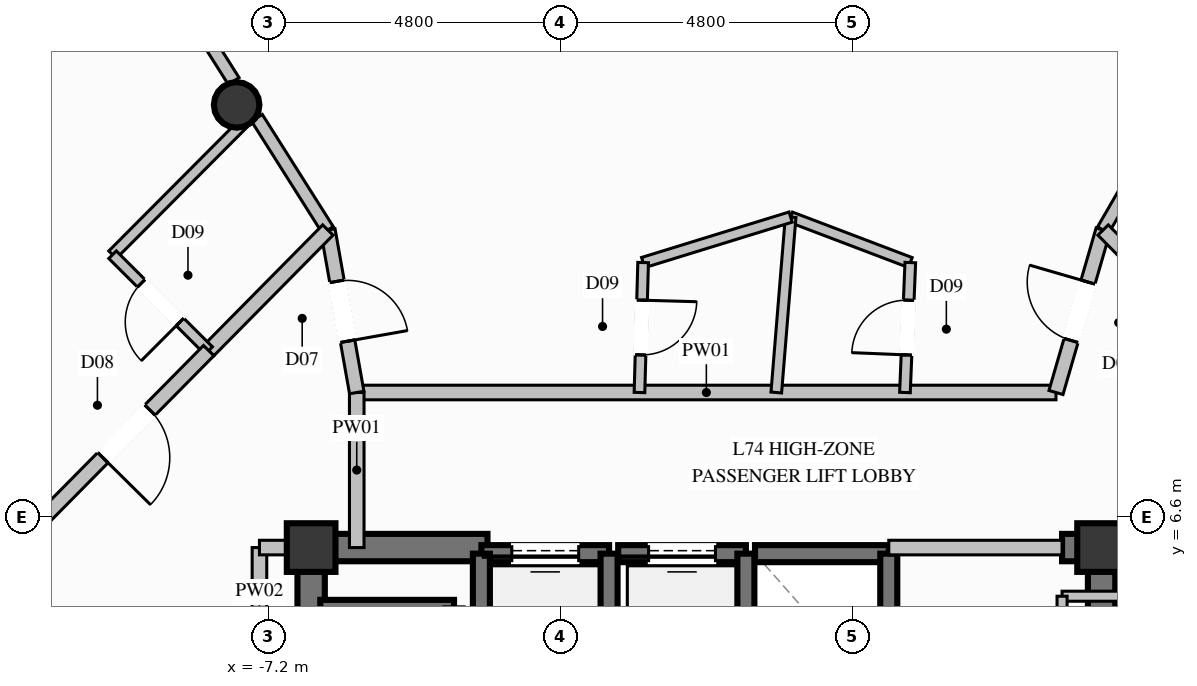
"""IFC4 building model, lengths in metres.
Left out: names, types, materials, properties, quantities, classifications, styles, units other than length and angle.
Written with IfcOpenShell. Run it as: python <this file> out.ifc"""

import sys

from ifc_helpers import new_model, si_unit, direction, frame, frame_2d, origin, origin_2d, place, context, subcontext, project, spatial, rectangle, circle, extrude, element, fill, save


model = new_model("IFC4")
c1 = context("Model", 3, precision=1e-05, world=origin(), true_north=direction((0.0, 1.0)))
c2 = subcontext(c1, "Body", "Model", "MODEL_VIEW")
j1 = project(units=[si_unit("LENGTHUNIT", "METRE"), si_unit("PLANEANGLEUNIT", "RADIAN")], contexts=[c1])
p1 = place(None, origin())
s1 = spatial("IfcSite", under=j1, at=p1, CompositionType="ELEMENT")
p2 = place(p1, origin())
s2 = spatial("IfcBuilding", under=s1, at=p2, CompositionType="ELEMENT")
p3 = place(p2, frame((0.0, 0.0, 285.8)))
s3 = spatial("IfcBuildingStorey", under=s2, at=p3, CompositionType="ELEMENT", Elevation=285.8)
for number, where, z_axis, x_axis in (
    (1, (6.5, 6.1, 0.0), (0.0, 0.0, 1.0), (1.0, 0.0, 0.0)),
    (2, (-6.5, 6.1, 0.0), (0.0, 0.0, 1.0), (1.0, 0.0, 0.0)),
):
    element("IfcColumn", number, at=place(p3, frame(where, z_axis=z_axis, x_axis=x_axis)), inside=s3, PredefinedType="COLUMN", context=c2, shape_type="SweptSolid", body=[
        extrude(rectangle(XDim=0.8, YDim=0.8, at=origin_2d()), origin(), (0.0, 0.0, 1.0), 3.8),
    ])
p4 = place(p3, frame((-6.275, 6.1, 0.0), z_axis=(0.0, 0.0, 1.0), x_axis=(1.0, 0.0, 0.0)))
e3 = element("IfcWall", 3, at=p4, inside=s3, PredefinedType="SHEAR", context=c2, shape_type="SweptSolid", body=[
    extrude(rectangle(XDim=2.675, YDim=0.45, at=frame_2d((1.337, 0.0))), origin(), (0.0, 0.0, 1.0), 3.8),
])
p5 = place(p3, frame((5.85, 6.1, 0.0), z_axis=(0.0, 0.0, 1.0), x_axis=(1.0, 0.0, 0.0)))
e4 = element("IfcWall", 4, at=p5, inside=s3, PredefinedType="SHEAR", context=c2, shape_type="SweptSolid", body=[
    extrude(rectangle(XDim=0.425, YDim=0.45, at=frame_2d((0.212, 0.0))), origin(), (0.0, 0.0, 1.0), 3.8),
])
p6 = place(p3, frame((-6.5, 2.35, 0.0), z_axis=(0.0, 0.0, 1.0), x_axis=(0.0, 1.0, 0.0)))
e5 = element("IfcWall", 5, at=p6, inside=s3, PredefinedType="SHEAR", context=c2, shape_type="SweptSolid", body=[
    extrude(rectangle(XDim=3.975, YDim=0.45, at=frame_2d((1.987, 0.0))), origin(), (0.0, 0.0, 1.0), 3.8),
])
p7 = place(p3, frame((6.5, 3.35, 0.0), z_axis=(0.0, 0.0, 1.0), x_axis=(0.0, 1.0, 0.0)))
e6 = element("IfcWall", 6, at=p7, inside=s3, PredefinedType="SHEAR", context=c2, shape_type="SweptSolid", body=[
    extrude(rectangle(XDim=2.975, YDim=0.45, at=frame_2d((1.487, 0.0))), origin(), (0.0, 0.0, 1.0), 3.8),
])
p8 = place(p3, frame((-7.725, 13.38, 0.0), z_axis=(0.0, 0.0, 1.0), x_axis=(1.0, 0.0, 0.0)))
e7 = element("IfcColumn", 7, at=p8, inside=s3, PredefinedType="COLUMN", context=c2, shape_type="SweptSolid", body=[
    extrude(circle(Radius=0.375, at=origin_2d()), origin(), (0.0, 0.0, 1.0), 3.8),
])
p9 = place(p3, frame((-1.6, 6.0, 0.0), z_axis=(0.0, 0.0, 1.0), x_axis=(-1.0, 0.0, 0.0)))
e8 = element("IfcWall", 8, at=p9, inside=s3, PredefinedType="SOLIDWALL", context=c2, shape_type="SweptSolid", body=[
    extrude(rectangle(XDim=2.1, YDim=0.28, at=frame_2d((1.05, 0.0))), origin(), (0.0, 0.0, 1.0), 3.57),
])
p10 = place(p9, frame((0.5, 0.0, 0.0)))
e9 = element("IfcOpeningElement", 9, at=p10, cuts=e8, PredefinedType="OPENING", context=c2, shape_type="SweptSolid", body=[
    extrude(rectangle(XDim=1.1, YDim=2.2, at=frame_2d((0.55, 1.1))), frame((0.0, 0.15, 0.0), z_axis=(0.0, -1.0, 0.0), x_axis=(1.0, 0.0, 0.0)), (0.0, 0.0, 1.0), 0.3),
])
for number, where, z_axis, x_axis in (
    (10, (-3.7, 6.0, 0.0), (0.0, 0.0, 1.0), (0.0, -1.0, 0.0)),
    (11, (-1.6, 3.5, 0.0), (0.0, 0.0, 1.0), (0.0, 1.0, 0.0)),
):
    element("IfcWall", number, at=place(p3, frame(where, z_axis=z_axis, x_axis=x_axis)), inside=s3, PredefinedType="SOLIDWALL", context=c2, shape_type="SweptSolid", body=[
        extrude(rectangle(XDim=2.5, YDim=0.28, at=frame_2d((1.25, 0.0))), origin(), (0.0, 0.0, 1.0), 3.57),
    ])
p11 = place(p3, frame((0.65, 6.0, 0.0), z_axis=(0.0, 0.0, 1.0), x_axis=(-1.0, 0.0, 0.0)))
e12 = element("IfcWall", 12, at=p11, inside=s3, PredefinedType="SOLIDWALL", context=c2, shape_type="SweptSolid", body=[
    extrude(rectangle(XDim=2.1, YDim=0.28, at=frame_2d((1.05, 0.0))), origin(), (0.0, 0.0, 1.0), 3.57),
])
p12 = place(p11, frame((0.5, 0.0, 0.0)))
e13 = element("IfcOpeningElement", 13, at=p12, cuts=e12, PredefinedType="OPENING", context=c2, shape_type="SweptSolid", body=[
    extrude(rectangle(XDim=1.1, YDim=2.2, at=frame_2d((0.55, 1.1))), frame((0.0, 0.15, 0.0), z_axis=(0.0, -1.0, 0.0), x_axis=(1.0, 0.0, 0.0)), (0.0, 0.0, 1.0), 0.3),
])
p13 = place(p3, frame((0.65, 3.5, 0.0), z_axis=(0.0, 0.0, 1.0), x_axis=(0.0, 1.0, 0.0)))
e14 = element("IfcWall", 14, at=p13, inside=s3, PredefinedType="SOLIDWALL", context=c2, shape_type="SweptSolid", body=[
    extrude(rectangle(XDim=2.5, YDim=0.28, at=frame_2d((1.25, 0.0))), origin(), (0.0, 0.0, 1.0), 3.57),
])
p14 = place(p3, frame((3.0, 6.0, 0.0), z_axis=(0.0, 0.0, 1.0), x_axis=(-1.0, 0.0, 0.0)))
e15 = element("IfcWall", 15, at=p14, inside=s3, PredefinedType="SOLIDWALL", context=c2, shape_type="SweptSolid", body=[
    extrude(rectangle(XDim=2.2, YDim=0.28, at=frame_2d((1.1, 0.0))), origin(), (0.0, 0.0, 1.0), 3.57),
])
p15 = place(p3, frame((3.0, 3.5, 0.0), z_axis=(0.0, 0.0, 1.0), x_axis=(0.0, 1.0, 0.0)))
e16 = element("IfcWall", 16, at=p15, inside=s3, PredefinedType="SOLIDWALL", context=c2, shape_type="SweptSolid", body=[
    extrude(rectangle(XDim=2.5, YDim=0.28, at=frame_2d((1.25, 0.0))), origin(), (0.0, 0.0, 1.0), 3.57),
])
p16 = place(p3, frame((-4.15, 5.1, 0.0), z_axis=(0.0, 0.0, 1.0), x_axis=(-1.0, 0.0, 0.0)))
e17 = element("IfcWall", 17, at=p16, inside=s3, PredefinedType="SOLIDWALL", context=c2, shape_type="SweptSolid", body=[
    extrude(rectangle(XDim=2.2, YDim=0.28, at=frame_2d((1.1, 0.0))), origin(), (0.0, 0.0, 1.0), 3.57),
])
p17 = place(p3, frame((-5.75, 8.65, 0.0), z_axis=(0.0, 0.0, 1.0), x_axis=(1.0, 0.0, 0.0)))
e18 = element("IfcWall", 18, at=p17, inside=s3, PredefinedType="PARTITIONING", context=c2, shape_type="SweptSolid", body=[
    extrude(rectangle(XDim=11.5, YDim=0.24, at=frame_2d((5.75, 0.0))), origin(), (0.0, 0.0, 1.0), 3.57),
])
p18 = place(p3, frame((3.0, 6.1, 0.0), z_axis=(0.0, 0.0, 1.0), x_axis=(1.0, 0.0, 0.0)))
e19 = element("IfcWall", 19, at=p18, inside=s3, PredefinedType="PARTITIONING", context=c2, shape_type="SweptSolid", body=[
    extrude(rectangle(XDim=2.85, YDim=0.24, at=frame_2d((1.425, 0.0))), origin(), (0.0, 0.0, 1.0), 2.655),
])
p19 = place(p3, frame((6.5, 6.1, 0.0), z_axis=(0.0, 0.0, 1.0), x_axis=(1.0, 0.0, 0.0)))
e20 = element("IfcWall", 20, at=p19, inside=s3, PredefinedType="PARTITIONING", context=c2, shape_type="SweptSolid", body=[
    extrude(rectangle(XDim=0.85, YDim=0.24, at=frame_2d((0.425, 0.0))), origin(), (0.0, 0.0, 1.0), 3.011),
])
p20 = place(p3, frame((-5.75, 6.1, 0.0), z_axis=(0.0, 0.0, 1.0), x_axis=(0.0, 1.0, 0.0)))
e21 = element("IfcWall", 21, at=p20, inside=s3, PredefinedType="PARTITIONING", context=c2, shape_type="SweptSolid", body=[
    extrude(rectangle(XDim=2.55, YDim=0.24, at=frame_2d((1.275, 0.0))), origin(), (0.0, 0.0, 1.0), 3.57),
])
p21 = place(p3, frame((-7.35, 4.95, 0.0), z_axis=(0.0, 0.0, 1.0), x_axis=(0.0, 1.0, 0.0)))
e22 = element("IfcWall", 22, at=p21, inside=s3, PredefinedType="PARTITIONING", context=c2, shape_type="SweptSolid", body=[
    extrude(rectangle(XDim=1.15, YDim=0.24, at=frame_2d((0.575, 0.0))), origin(), (0.0, 0.0, 1.0), 2.655),
])
p22 = place(p3, frame((-7.35, 6.1, 0.0), z_axis=(0.0, 0.0, 1.0), x_axis=(1.0, 0.0, 0.0)))
e23 = element("IfcWall", 23, at=p22, inside=s3, PredefinedType="PARTITIONING", context=c2, shape_type="SweptSolid", body=[
    extrude(rectangle(XDim=0.85, YDim=0.24, at=frame_2d((0.425, 0.0))), origin(), (0.0, 0.0, 1.0), 3.011),
])
p23 = place(p3, frame((7.35, 5.3, 0.0), z_axis=(0.0, 0.0, 1.0), x_axis=(-1.0, 0.0, 0.0)))
e24 = element("IfcWall", 24, at=p23, inside=s3, PredefinedType="PARTITIONING", context=c2, shape_type="SweptSolid", body=[
    extrude(rectangle(XDim=1.5, YDim=0.165, at=frame_2d((0.75, 0.0))), origin(), (0.0, 0.0, 1.0), 2.655),
])
p24 = place(p3, frame((5.85, 5.3, 0.0), z_axis=(0.0, 0.0, 1.0), x_axis=(0.0, -1.0, 0.0)))
e25 = element("IfcWall", 25, at=p24, inside=s3, PredefinedType="PARTITIONING", context=c2, shape_type="SweptSolid", body=[
    extrude(rectangle(XDim=2.55, YDim=0.165, at=frame_2d((1.275, 0.0))), origin(), (0.0, 0.0, 1.0), 2.655),
])
p25 = place(p3, frame((6.525, 11.322, 0.0), z_axis=(0.0, 0.0, 1.0), x_axis=(0.501738314133, 0.865019458817, 0.0)))
e26 = element("IfcWall", 26, at=p25, inside=s3, PredefinedType="PARTITIONING", context=c2, shape_type="SweptSolid", body=[
    extrude(rectangle(XDim=1.987, YDim=0.21, at=frame_2d((0.994, 0.0))), origin(), (0.0, 0.0, 1.0), 3.011),
])
p26 = place(p3, frame((-6.225, 11.322, 0.0), z_axis=(0.0, 0.0, 1.0), x_axis=(-0.534565103323, 0.845127298287, 0.0)))
e27 = element("IfcWall", 27, at=p26, inside=s3, PredefinedType="PARTITIONING", context=c2, shape_type="SweptSolid", body=[
    extrude(rectangle(XDim=2.183, YDim=0.21, at=frame_2d((1.092, 0.0))), origin(), (0.0, 0.0, 1.0), 3.011),
])
p27 = place(p3, frame((-7.774, 13.772, 0.0), z_axis=(0.0, 0.0, 1.0), x_axis=(-0.534555632153, 0.845133288975, 0.0)))
e28 = element("IfcWall", 28, at=p27, inside=s3, PredefinedType="PARTITIONING", context=c2, shape_type="SweptSolid", body=[
    extrude(rectangle(XDim=3.803, YDim=0.21, at=frame_2d((1.901, 0.0))), origin(), (0.0, 0.0, 1.0), 3.57),
])
p28 = place(p3, frame((1.386, 11.535, 0.0), z_axis=(0.0, 0.0, 1.0), x_axis=(0.934790511534, -0.355199520758, 0.0)))
e29 = element("IfcWall", 29, at=p28, inside=s3, PredefinedType="PLUMBINGWALL", context=c2, shape_type="SweptSolid", body=[
    extrude(rectangle(XDim=2.105, YDim=0.175, at=frame_2d((1.053, 0.0))), origin(), (0.0, 0.0, 1.0), 3.57),
])
p29 = place(p3, frame((1.386, 11.535, 0.0), z_axis=(0.0, 0.0, 1.0), x_axis=(-0.081558642855, -0.99666854459, 0.0)))
e30 = element("IfcWall", 30, at=p29, inside=s3, PredefinedType="PLUMBINGWALL", context=c2, shape_type="SweptSolid", body=[
    extrude(rectangle(XDim=2.895, YDim=0.175, at=frame_2d((1.447, 0.0))), origin(), (0.0, 0.0, 1.0), 3.57),
])
p30 = place(p3, frame((3.266, 8.65, 0.0), z_axis=(0.0, 0.0, 1.0), x_axis=(0.04108932736, 0.999155476979, 0.0)))
e31 = element("IfcWall", 31, at=p30, inside=s3, PredefinedType="PLUMBINGWALL", context=c2, shape_type="SweptSolid", body=[
    extrude(rectangle(XDim=2.139, YDim=0.175, at=frame_2d((1.069, 0.0))), origin(), (0.0, 0.0, 1.0), 3.57),
])
p31 = place(p30, frame((0.619, 0.0, 0.0)))
e32 = element("IfcOpeningElement", 32, at=p31, cuts=e31, PredefinedType="OPENING", context=c2, shape_type="SweptSolid", body=[
    extrude(rectangle(XDim=0.9, YDim=2.1, at=frame_2d((0.45, 1.05))), frame((0.0, 0.098, 0.0), z_axis=(0.0, -1.0, 0.0), x_axis=(1.0, 0.0, 0.0)), (0.0, 0.0, 1.0), 0.195),
])
p32 = place(p3, frame((5.75, 8.65, 0.0), z_axis=(0.0, 0.0, 1.0), x_axis=(0.27852040308, 0.960430312448, 0.0)))
e33 = element("IfcWall", 33, at=p32, inside=s3, PredefinedType="PARTITIONING", context=c2, shape_type="SweptSolid", body=[
    extrude(rectangle(XDim=2.782, YDim=0.24, at=frame_2d((1.391, 0.0))), origin(), (0.0, 0.0, 1.0), 3.57),
])
p33 = place(p32, frame((0.891, 0.0, 0.0)))
e34 = element("IfcOpeningElement", 34, at=p33, cuts=e33, PredefinedType="OPENING", context=c2, shape_type="SweptSolid", body=[
    extrude(rectangle(XDim=1.0, YDim=2.2, at=frame_2d((0.5, 1.1))), frame((0.0, 0.13, 0.0), z_axis=(0.0, -1.0, 0.0), x_axis=(1.0, 0.0, 0.0)), (0.0, 0.0, 1.0), 0.26),
])
p34 = place(p3, frame((-1.04, 10.787, 0.0), z_axis=(0.0, 0.0, 1.0), x_axis=(0.955631255894, 0.294565617068, 0.0)))
e35 = element("IfcWall", 35, at=p34, inside=s3, PredefinedType="PLUMBINGWALL", context=c2, shape_type="SweptSolid", body=[
    extrude(rectangle(XDim=2.539, YDim=0.175, at=frame_2d((1.269, 0.0))), origin(), (0.0, 0.0, 1.0), 3.57),
])
p35 = place(p3, frame((-1.04, 10.787, 0.0), z_axis=(0.0, 0.0, 1.0), x_axis=(-0.028090350184, -0.999605388254, 0.0)))
e36 = element("IfcWall", 36, at=p35, inside=s3, PredefinedType="PLUMBINGWALL", context=c2, shape_type="SweptSolid", body=[
    extrude(rectangle(XDim=2.138, YDim=0.175, at=frame_2d((1.069, 0.0))), origin(), (0.0, 0.0, 1.0), 3.57),
])
p36 = place(p35, frame((0.619, 0.0, 0.0)))
e37 = element("IfcOpeningElement", 37, at=p36, cuts=e36, PredefinedType="OPENING", context=c2, shape_type="SweptSolid", body=[
    extrude(rectangle(XDim=0.9, YDim=2.1, at=frame_2d((0.45, 1.05))), frame((0.0, 0.098, 0.0), z_axis=(0.0, -1.0, 0.0), x_axis=(1.0, 0.0, 0.0)), (0.0, 0.0, 1.0), 0.195),
])
p37 = place(p3, frame((-6.225, 11.322, 0.0), z_axis=(0.0, 0.0, 1.0), x_axis=(0.175052712288, -0.984559062688, 0.0)))
e38 = element("IfcWall", 38, at=p37, inside=s3, PredefinedType="PARTITIONING", context=c2, shape_type="SweptSolid", body=[
    extrude(rectangle(XDim=2.714, YDim=0.24, at=frame_2d((1.357, 0.0))), origin(), (0.0, 0.0, 1.0), 3.57),
])
p38 = place(p37, frame((0.857, 0.0, 0.0)))
e39 = element("IfcOpeningElement", 39, at=p38, cuts=e38, PredefinedType="OPENING", context=c2, shape_type="SweptSolid", body=[
    extrude(rectangle(XDim=1.0, YDim=2.2, at=frame_2d((0.5, 1.1))), frame((0.0, 0.13, 0.0), z_axis=(0.0, -1.0, 0.0), x_axis=(1.0, 0.0, 0.0)), (0.0, 0.0, 1.0), 0.26),
])
p39 = place(p3, frame((-6.225, 11.322, 0.0), z_axis=(0.0, 0.0, 1.0), x_axis=(-0.702979205765, -0.711210402245, 0.0)))
e40 = element("IfcWall", 40, at=p39, inside=s3, PredefinedType="PARTITIONING", context=c2, shape_type="SweptSolid", body=[
    extrude(rectangle(XDim=2.788, YDim=0.24, at=frame_2d((1.394, 0.0))), origin(), (0.0, 0.0, 1.0), 3.57),
])
p40 = place(p3, frame((-7.443, 13.248, 0.0), z_axis=(0.0, 0.0, 1.0), x_axis=(-0.705733293668, -0.708477606003, 0.0)))
e41 = element("IfcWall", 41, at=p40, inside=s3, PredefinedType="PLUMBINGWALL", context=c2, shape_type="SweptSolid", body=[
    extrude(rectangle(XDim=3.292, YDim=0.175, at=frame_2d((1.646, 0.0))), origin(), (0.0, 0.0, 1.0), 3.137),
])
p41 = place(p3, frame((-8.185, 9.339, 0.0), z_axis=(0.0, 0.0, 1.0), x_axis=(-0.708035494418, 0.706176846579, 0.0)))
e42 = element("IfcWall", 42, at=p41, inside=s3, PredefinedType="PLUMBINGWALL", context=c2, shape_type="SweptSolid", body=[
    extrude(rectangle(XDim=2.233, YDim=0.175, at=frame_2d((1.116, 0.0))), origin(), (0.0, 0.0, 1.0), 3.57),
])
p42 = place(p41, frame((0.667, 0.0, 0.0)))
e43 = element("IfcOpeningElement", 43, at=p42, cuts=e42, PredefinedType="OPENING", context=c2, shape_type="SweptSolid", body=[
    extrude(rectangle(XDim=0.9, YDim=2.1, at=frame_2d((0.45, 1.05))), frame((0.0, 0.098, 0.0), z_axis=(0.0, -1.0, 0.0), x_axis=(1.0, 0.0, 0.0)), (0.0, 0.0, 1.0), 0.195),
])
p43 = place(p3, frame((-8.185, 9.339, 0.0), z_axis=(0.0, 0.0, 1.0), x_axis=(-0.702942107486, -0.711247069254, 0.0)))
e44 = element("IfcWall", 44, at=p43, inside=s3, PredefinedType="PARTITIONING", context=c2, shape_type="SweptSolid", body=[
    extrude(rectangle(XDim=3.851, YDim=0.24, at=frame_2d((1.926, 0.0))), origin(), (0.0, 0.0, 1.0), 3.57),
])
p44 = place(p43, frame((1.375, 0.0, 0.0)))
e45 = element("IfcOpeningElement", 45, at=p44, cuts=e44, PredefinedType="OPENING", context=c2, shape_type="SweptSolid", body=[
    extrude(rectangle(XDim=1.1, YDim=2.3, at=frame_2d((0.55, 1.15))), frame((0.0, 0.13, 0.0), z_axis=(0.0, -1.0, 0.0), x_axis=(1.0, 0.0, 0.0)), (0.0, 0.0, 1.0), 0.26),
])
p45 = place(p3, frame((9.232, 8.583, 0.0), z_axis=(0.0, 0.0, 1.0), x_axis=(-0.702942107486, 0.711247069254, 0.0)))
e46 = element("IfcWall", 46, at=p45, inside=s3, PredefinedType="PARTITIONING", context=c2, shape_type="SweptSolid", body=[
    extrude(rectangle(XDim=3.851, YDim=0.24, at=frame_2d((1.926, 0.0))), origin(), (0.0, 0.0, 1.0), 3.57),
])
p46 = place(p45, frame((1.425, 0.0, 0.0)))
e47 = element("IfcOpeningElement", 47, at=p46, cuts=e46, PredefinedType="OPENING", context=c2, shape_type="SweptSolid", body=[
    extrude(rectangle(XDim=1.0, YDim=2.2, at=frame_2d((0.5, 1.1))), frame((0.0, 0.13, 0.0), z_axis=(0.0, -1.0, 0.0), x_axis=(1.0, 0.0, 0.0)), (0.0, 0.0, 1.0), 0.26),
])
p47 = place(p10, origin())
e48 = element("IfcDoor", 48, at=p47, inside=s3, OperationType="SLIDING_TO_LEFT", PredefinedType="DOOR", context=c2, shape_type="SweptSolid", body=[
    extrude(rectangle(XDim=1.1, YDim=2.2, at=frame_2d((0.55, 1.1))), frame((0.0, 0.025, 0.0), z_axis=(0.0, -1.0, 0.0), x_axis=(1.0, 0.0, 0.0)), (0.0, 0.0, 1.0), 0.05),
])
fill(e9, e48)
p48 = place(p12, origin())
e49 = element("IfcDoor", 49, at=p48, inside=s3, OperationType="SLIDING_TO_LEFT", PredefinedType="DOOR", context=c2, shape_type="SweptSolid", body=[
    extrude(rectangle(XDim=1.1, YDim=2.2, at=frame_2d((0.55, 1.1))), frame((0.0, 0.025, 0.0), z_axis=(0.0, -1.0, 0.0), x_axis=(1.0, 0.0, 0.0)), (0.0, 0.0, 1.0), 0.05),
])
fill(e13, e49)
p49 = place(p31, origin())
e50 = element("IfcDoor", 50, at=p49, inside=s3, OperationType="SINGLE_SWING_LEFT", PredefinedType="DOOR", context=c2, shape_type="SweptSolid", body=[
    extrude(rectangle(XDim=0.9, YDim=2.1, at=frame_2d((0.45, 1.05))), frame((0.0, 0.025, 0.0), z_axis=(0.0, -1.0, 0.0), x_axis=(1.0, 0.0, 0.0)), (0.0, 0.0, 1.0), 0.05),
])
fill(e32, e50)
p50 = place(p33, origin())
e51 = element("IfcDoor", 51, at=p50, inside=s3, OperationType="SINGLE_SWING_RIGHT", PredefinedType="DOOR", context=c2, shape_type="SweptSolid", body=[
    extrude(rectangle(XDim=1.0, YDim=2.2, at=frame_2d((0.5, 1.1))), frame((0.0, 0.025, 0.0), z_axis=(0.0, -1.0, 0.0), x_axis=(1.0, 0.0, 0.0)), (0.0, 0.0, 1.0), 0.05),
])
fill(e34, e51)
p51 = place(p36, origin())
e52 = element("IfcDoor", 52, at=p51, inside=s3, OperationType="SINGLE_SWING_LEFT", PredefinedType="DOOR", context=c2, shape_type="SweptSolid", body=[
    extrude(rectangle(XDim=0.9, YDim=2.1, at=frame_2d((0.45, 1.05))), frame((0.0, 0.025, 0.0), z_axis=(0.0, -1.0, 0.0), x_axis=(1.0, 0.0, 0.0)), (0.0, 0.0, 1.0), 0.05),
])
fill(e37, e52)
p52 = place(p38, origin())
e53 = element("IfcDoor", 53, at=p52, inside=s3, OperationType="SINGLE_SWING_RIGHT", PredefinedType="DOOR", context=c2, shape_type="SweptSolid", body=[
    extrude(rectangle(XDim=1.0, YDim=2.2, at=frame_2d((0.5, 1.1))), frame((0.0, 0.025, 0.0), z_axis=(0.0, -1.0, 0.0), x_axis=(1.0, 0.0, 0.0)), (0.0, 0.0, 1.0), 0.05),
])
fill(e39, e53)
p53 = place(p42, origin())
e54 = element("IfcDoor", 54, at=p53, inside=s3, OperationType="SINGLE_SWING_LEFT", PredefinedType="DOOR", context=c2, shape_type="SweptSolid", body=[
    extrude(rectangle(XDim=0.9, YDim=2.1, at=frame_2d((0.45, 1.05))), frame((0.0, 0.025, 0.0), z_axis=(0.0, -1.0, 0.0), x_axis=(1.0, 0.0, 0.0)), (0.0, 0.0, 1.0), 0.05),
])
fill(e43, e54)
p54 = place(p44, origin())
e55 = element("IfcDoor", 55, at=p54, inside=s3, OperationType="SINGLE_SWING_RIGHT", PredefinedType="DOOR", context=c2, shape_type="SweptSolid", body=[
    extrude(rectangle(XDim=1.1, YDim=2.3, at=frame_2d((0.55, 1.15))), frame((0.0, 0.025, 0.0), z_axis=(0.0, -1.0, 0.0), x_axis=(1.0, 0.0, 0.0)), (0.0, 0.0, 1.0), 0.05),
])
fill(e45, e55)
save(model, sys.argv[1])
